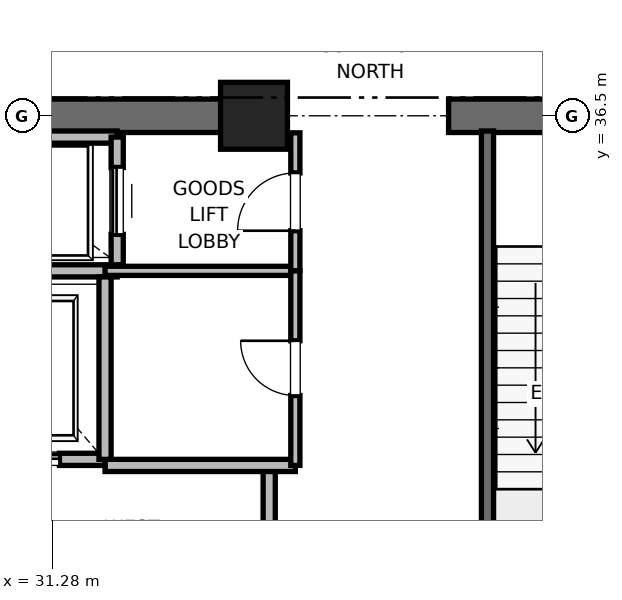
"""IFC4 building model, lengths in metres.
Left out: names, types, materials, properties, quantities, classifications, styles, units other than length and angle.
Written with IfcOpenShell. Run it as: python <this file> out.ifc"""

import sys

from ifc_helpers import new_model, si_unit, direction, frame, frame_2d, origin, origin_2d, place, context, subcontext, project, spatial, rectangle, extrude, element, fill, save


model = new_model("IFC4")
c1 = context("Model", 3, precision=1e-05, world=origin(), true_north=direction((0.0, 1.0)))
c2 = subcontext(c1, "Body", "Model", "MODEL_VIEW")
j1 = project(units=[si_unit("LENGTHUNIT", "METRE"), si_unit("PLANEANGLEUNIT", "RADIAN")], contexts=[c1])
p1 = place(None, origin())
s1 = spatial("IfcSite", under=j1, at=p1, CompositionType="ELEMENT")
p2 = place(p1, origin())
s2 = spatial("IfcBuilding", under=s1, at=p2, CompositionType="ELEMENT")
p3 = place(p2, frame((0.0, 0.0, 118.4)))
s3 = spatial("IfcBuildingStorey", under=s2, at=p3, CompositionType="ELEMENT", Elevation=118.4)
p4 = place(p3, frame((34.6, 36.5, 0.0), z_axis=(0.0, 0.0, 1.0), x_axis=(1.0, 0.0, 0.0)))
e1 = element("IfcColumn", 1, at=p4, inside=s3, PredefinedType="PILASTER", context=c2, shape_type="SweptSolid", body=[
    extrude(rectangle(XDim=1.1, YDim=1.1, at=origin_2d()), origin(), (0.0, 0.0, 1.0), 5.0),
])
p5 = place(p3, frame((29.0, 36.5, 0.0), z_axis=(0.0, 0.0, 1.0), x_axis=(1.0, 0.0, 0.0)))
e2 = element("IfcWall", 2, at=p5, inside=s3, PredefinedType="SHEAR", context=c2, shape_type="SweptSolid", body=[
    extrude(rectangle(XDim=5.8, YDim=0.55, at=frame_2d((2.9, 0.0))), origin(), (0.0, 0.0, 1.0), 4.7),
])
p6 = place(p3, frame((37.8, 36.5, 0.0), z_axis=(0.0, 0.0, 1.0), x_axis=(1.0, 0.0, 0.0)))
e3 = element("IfcWall", 3, at=p6, inside=s3, PredefinedType="SHEAR", context=c2, shape_type="SweptSolid", body=[
    extrude(rectangle(XDim=4.4, YDim=0.55, at=frame_2d((2.2, 0.0))), origin(), (0.0, 0.0, 1.0), 4.7),
])
p7 = place(p6, frame((1.65, 0.0, 0.0)))
e4 = element("IfcOpeningElement", 4, at=p7, cuts=e3, PredefinedType="OPENING", context=c2, shape_type="SweptSolid", body=[
    extrude(rectangle(XDim=1.1, YDim=2.15, at=frame_2d((0.55, 1.075))), frame((0.0, 0.275, 0.0), z_axis=(0.0, -1.0, 0.0), x_axis=(1.0, 0.0, 0.0)), (0.0, 0.0, 1.0), 0.55),
])
p8 = place(p3, frame((38.44, 27.38, 0.0), z_axis=(0.0, 0.0, 1.0), x_axis=(0.0, 1.0, 0.0)))
e5 = element("IfcWall", 5, at=p8, inside=s3, PredefinedType="SOLIDWALL", context=c2, shape_type="SweptSolid", body=[
    extrude(rectangle(XDim=8.87, YDim=0.2, at=frame_2d((4.435, 0.0))), origin(), (0.0, 0.0, 1.0), 4.7),
])
p9 = place(p3, frame((34.85, 27.38, 0.0), z_axis=(0.0, 0.0, 1.0), x_axis=(0.0, 1.0, 0.0)))
e6 = element("IfcWall", 6, at=p9, inside=s3, PredefinedType="PARTITIONING", context=c2, shape_type="SweptSolid", body=[
    extrude(rectangle(XDim=3.37, YDim=0.2, at=frame_2d((1.685, 0.0))), origin(), (0.0, 0.0, 1.0), 4.7),
])
p10 = place(p9, frame((1.11, 0.0, 0.0)))
e7 = element("IfcOpeningElement", 7, at=p10, cuts=e6, PredefinedType="OPENING", context=c2, shape_type="SweptSolid", body=[
    extrude(rectangle(XDim=1.15, YDim=2.2, at=frame_2d((0.575, 1.1))), frame((0.0, 0.1, 0.0), z_axis=(0.0, -1.0, 0.0), x_axis=(1.0, 0.0, 0.0)), (0.0, 0.0, 1.0), 0.2),
])
p11 = place(p3, frame((32.15, 30.75, 0.0), z_axis=(0.0, 0.0, 1.0), x_axis=(1.0, 0.0, 0.0)))
e8 = element("IfcWall", 8, at=p11, inside=s3, PredefinedType="PARTITIONING", context=c2, shape_type="SweptSolid", body=[
    extrude(rectangle(XDim=3.13, YDim=0.2, at=frame_2d((1.565, 0.0))), origin(), (0.0, 0.0, 1.0), 4.7),
])
p12 = place(p3, frame((29.55, 30.85, 0.0), z_axis=(0.0, 0.0, 1.0), x_axis=(1.0, 0.0, 0.0)))
e9 = element("IfcWall", 9, at=p12, inside=s3, PredefinedType="SOLIDWALL", context=c2, shape_type="SweptSolid", body=[
    extrude(rectangle(XDim=2.6, YDim=0.2, at=frame_2d((1.3, 0.0))), origin(), (0.0, 0.0, 1.0), 3.68),
])
p13 = place(p12, frame((0.75, 0.0, 0.0)))
e10 = element("IfcOpeningElement", 10, at=p13, cuts=e9, PredefinedType="OPENING", context=c2, shape_type="SweptSolid", body=[
    extrude(rectangle(XDim=1.1, YDim=2.2, at=frame_2d((0.55, 1.1))), frame((0.0, 0.1, 0.0), z_axis=(0.0, -1.0, 0.0), x_axis=(1.0, 0.0, 0.0)), (0.0, 0.0, 1.0), 0.2),
])
p14 = place(p3, frame((29.55, 33.95, 0.0), z_axis=(0.0, 0.0, 1.0), x_axis=(1.0, 0.0, 0.0)))
e11 = element("IfcWall", 11, at=p14, inside=s3, PredefinedType="SOLIDWALL", context=c2, shape_type="SweptSolid", body=[
    extrude(rectangle(XDim=2.8, YDim=0.2, at=frame_2d((1.4, 0.0))), origin(), (0.0, 0.0, 1.0), 4.7),
])
p15 = place(p3, frame((32.15, 30.85, 0.0), z_axis=(0.0, 0.0, 1.0), x_axis=(0.0, 1.0, 0.0)))
e12 = element("IfcWall", 12, at=p15, inside=s3, PredefinedType="SOLIDWALL", context=c2, shape_type="SweptSolid", body=[
    extrude(rectangle(XDim=3.0, YDim=0.2, at=frame_2d((1.5, 0.0))), origin(), (0.0, 0.0, 1.0), 4.7),
])
p16 = place(p3, frame((32.35, 36.15, 0.0), z_axis=(0.0, 0.0, 1.0), x_axis=(-1.0, 0.0, 0.0)))
e13 = element("IfcWall", 13, at=p16, inside=s3, PredefinedType="SOLIDWALL", context=c2, shape_type="SweptSolid", body=[
    extrude(rectangle(XDim=2.8, YDim=0.2, at=frame_2d((1.4, 0.0))), origin(), (0.0, 0.0, 1.0), 3.91),
])
p17 = place(p3, frame((32.35, 34.05, 0.0), z_axis=(0.0, 0.0, 1.0), x_axis=(0.0, 1.0, 0.0)))
e14 = element("IfcWall", 14, at=p17, inside=s3, PredefinedType="SOLIDWALL", context=c2, shape_type="SweptSolid", body=[
    extrude(rectangle(XDim=2.1, YDim=0.2, at=frame_2d((1.05, 0.0))), origin(), (0.0, 0.0, 1.0), 4.7),
])
p18 = place(p17, frame((0.5, 0.0, 0.0)))
e15 = element("IfcOpeningElement", 15, at=p18, cuts=e14, PredefinedType="OPENING", context=c2, shape_type="SweptSolid", body=[
    extrude(rectangle(XDim=1.1, YDim=2.2, at=frame_2d((0.55, 1.1))), frame((0.0, 0.1, 0.0), z_axis=(0.0, -1.0, 0.0), x_axis=(1.0, 0.0, 0.0)), (0.0, 0.0, 1.0), 0.2),
])
p19 = place(p3, frame((32.15, 33.95, 0.0), z_axis=(0.0, 0.0, 1.0), x_axis=(1.0, 0.0, 0.0)))
e16 = element("IfcWall", 16, at=p19, inside=s3, PredefinedType="PARTITIONING", context=c2, shape_type="SweptSolid", body=[
    extrude(rectangle(XDim=3.13, YDim=0.15, at=frame_2d((1.565, 0.0))), origin(), (0.0, 0.0, 1.0), 2.85),
])
p20 = place(p3, frame((35.28, 33.95, 0.0), z_axis=(0.0, 0.0, 1.0), x_axis=(0.0, 1.0, 0.0)))
e17 = element("IfcWall", 17, at=p20, inside=s3, PredefinedType="PARTITIONING", context=c2, shape_type="SweptSolid", body=[
    extrude(rectangle(XDim=2.27, YDim=0.15, at=frame_2d((1.135, 0.0))), origin(), (0.0, 0.0, 1.0), 2.85),
])
p21 = place(p20, frame((0.66, 0.0, 0.0)))
e18 = element("IfcOpeningElement", 18, at=p21, cuts=e17, PredefinedType="OPENING", context=c2, shape_type="SweptSolid", body=[
    extrude(rectangle(XDim=0.95, YDim=2.15, at=frame_2d((0.475, 1.075))), frame((0.0, 0.075, 0.0), z_axis=(0.0, -1.0, 0.0), x_axis=(1.0, 0.0, 0.0)), (0.0, 0.0, 1.0), 0.15),
])
p22 = place(p3, frame((35.28, 30.75, 0.0), z_axis=(0.0, 0.0, 1.0), x_axis=(0.0, 1.0, 0.0)))
e19 = element("IfcWall", 19, at=p22, inside=s3, PredefinedType="PARTITIONING", context=c2, shape_type="SweptSolid", body=[
    extrude(rectangle(XDim=3.2, YDim=0.15, at=frame_2d((1.6, 0.0))), origin(), (0.0, 0.0, 1.0), 2.85),
])
p23 = place(p22, frame((1.15, 0.0, 0.0)))
e20 = element("IfcOpeningElement", 20, at=p23, cuts=e19, PredefinedType="OPENING", context=c2, shape_type="SweptSolid", body=[
    extrude(rectangle(XDim=0.9, YDim=2.1, at=frame_2d((0.45, 1.05))), frame((0.0, 0.075, 0.0), z_axis=(0.0, -1.0, 0.0), x_axis=(1.0, 0.0, 0.0)), (0.0, 0.0, 1.0), 0.15),
])
p24 = place(p13, origin())
e21 = element("IfcDoor", 21, at=p24, inside=s3, OperationType="SLIDING_TO_RIGHT", PredefinedType="DOOR", context=c2, shape_type="SweptSolid", body=[
    extrude(rectangle(XDim=1.1, YDim=2.2, at=frame_2d((0.55, 1.1))), frame((0.0, 0.025, 0.0), z_axis=(0.0, -1.0, 0.0), x_axis=(1.0, 0.0, 0.0)), (0.0, 0.0, 1.0), 0.05),
])
fill(e10, e21)
p25 = place(p18, origin())
e22 = element("IfcDoor", 22, at=p25, inside=s3, OperationType="SLIDING_TO_RIGHT", PredefinedType="DOOR", context=c2, shape_type="SweptSolid", body=[
    extrude(rectangle(XDim=1.1, YDim=2.2, at=frame_2d((0.55, 1.1))), frame((0.0, 0.025, 0.0), z_axis=(0.0, -1.0, 0.0), x_axis=(1.0, 0.0, 0.0)), (0.0, 0.0, 1.0), 0.05),
])
fill(e15, e22)
p26 = place(p21, origin())
e23 = element("IfcDoor", 23, at=p26, inside=s3, OperationType="SINGLE_SWING_LEFT", PredefinedType="DOOR", context=c2, shape_type="SweptSolid", body=[
    extrude(rectangle(XDim=0.95, YDim=2.15, at=frame_2d((0.475, 1.075))), frame((0.0, 0.025, 0.0), z_axis=(0.0, -1.0, 0.0), x_axis=(1.0, 0.0, 0.0)), (0.0, 0.0, 1.0), 0.05),
])
fill(e18, e23)
p27 = place(p23, origin())
e24 = element("IfcDoor", 24, at=p27, inside=s3, OperationType="SINGLE_SWING_RIGHT", PredefinedType="DOOR", context=c2, shape_type="SweptSolid", body=[
    extrude(rectangle(XDim=0.9, YDim=2.1, at=frame_2d((0.45, 1.05))), frame((0.0, 0.025, 0.0), z_axis=(0.0, -1.0, 0.0), x_axis=(1.0, 0.0, 0.0)), (0.0, 0.0, 1.0), 0.05),
])
fill(e20, e24)
save(model, sys.argv[1])
